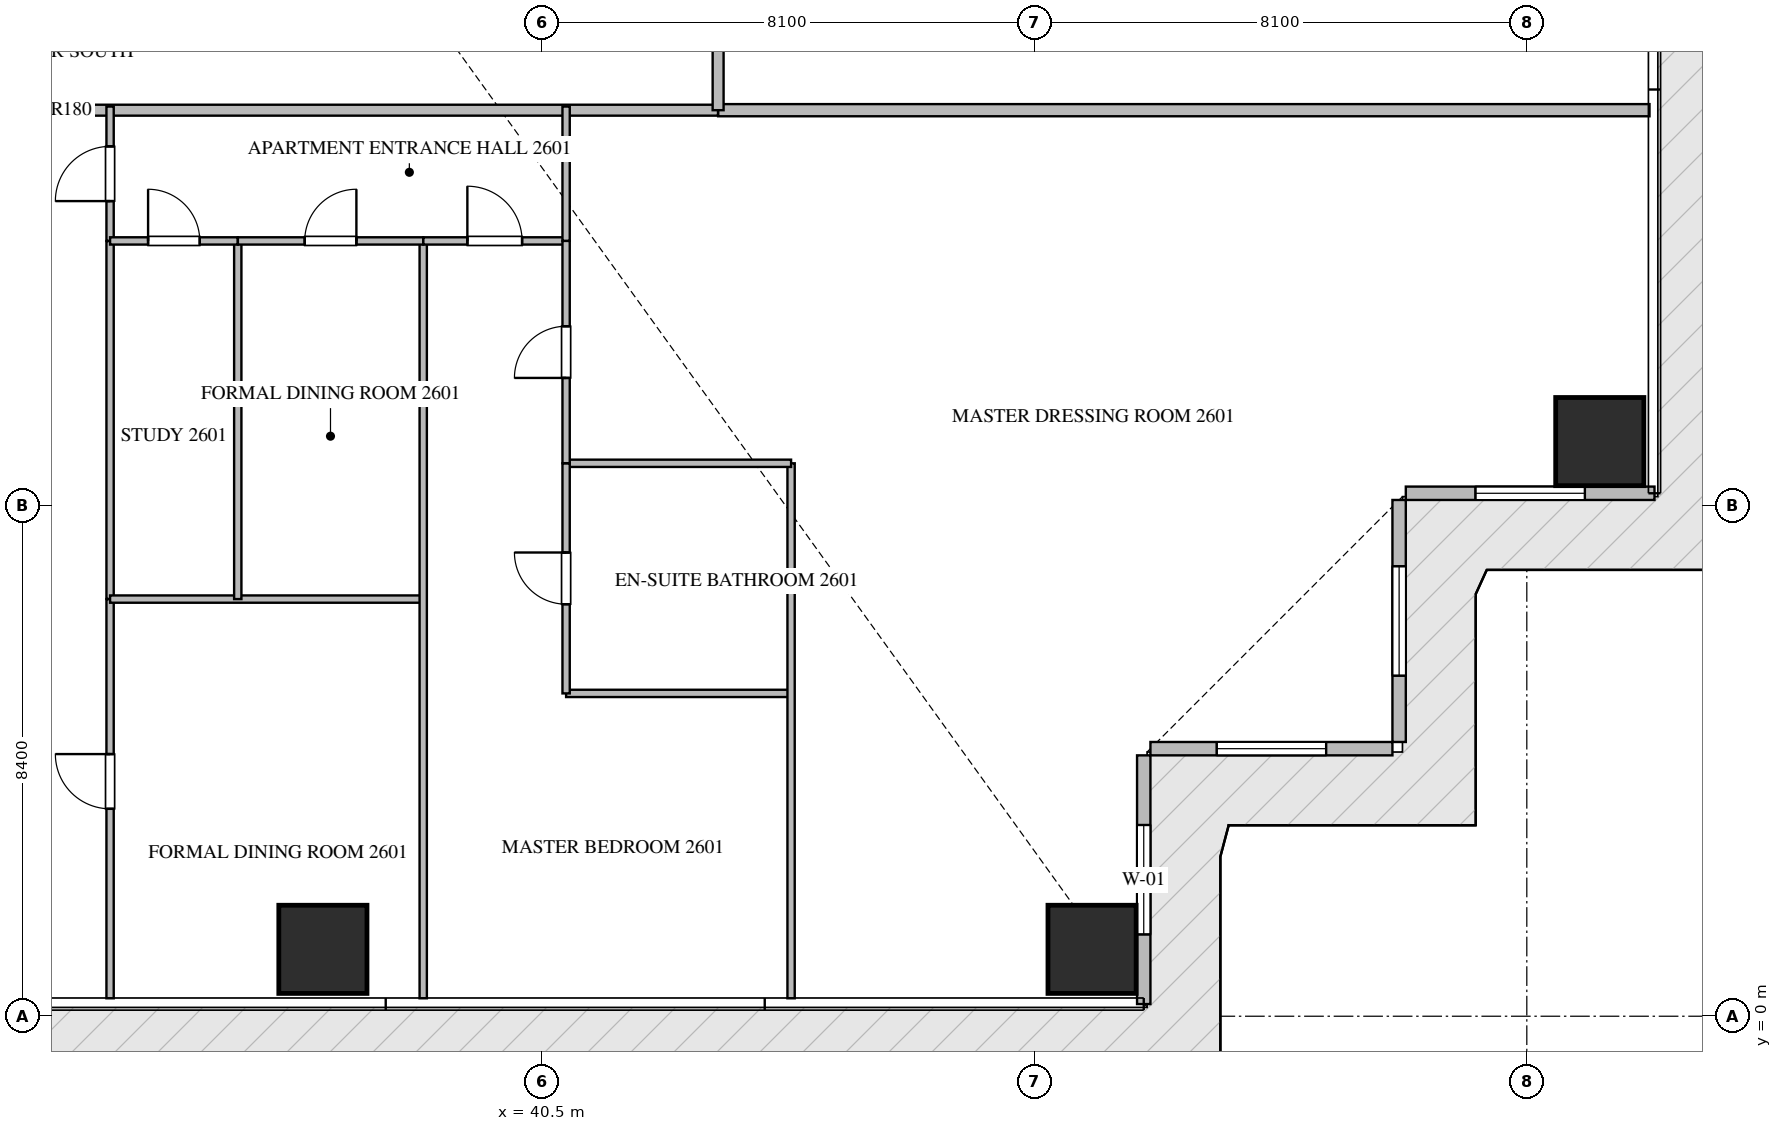
"""IFC4 building model, lengths in metres.
Left out: names, types, materials, properties, quantities, classifications, styles, units other than length and angle.
Written with IfcOpenShell. Run it as: python <this file> out.ifc"""

import sys

from ifc_helpers import new_model, si_unit, direction, frame, frame_2d, origin, origin_2d, place, context, subcontext, project, spatial, rectangle, extrude, source, transform, mapped, element, fill, save


model = new_model("IFC4")
c1 = context("Model", 3, precision=1e-05, world=origin(), true_north=direction((0.0, 1.0)))
c2 = subcontext(c1, "Body", "Model", "MODEL_VIEW")
j1 = project(units=[si_unit("LENGTHUNIT", "METRE"), si_unit("PLANEANGLEUNIT", "RADIAN")], contexts=[c1])
p1 = place(None, origin())
s1 = spatial("IfcSite", under=j1, at=p1, CompositionType="ELEMENT")
p2 = place(p1, origin())
s2 = spatial("IfcBuilding", under=s1, at=p2, CompositionType="ELEMENT")
p3 = place(p2, frame((0.0, 0.0, 105.45)))
s3 = spatial("IfcBuildingStorey", under=s2, at=p3, CompositionType="ELEMENT", Elevation=105.45)
m1 = source(origin(), c2, "Body", "SweptSolid", [
    extrude(rectangle(XDim=1.45, YDim=1.45, at=origin_2d()), origin(), (0.0, 0.0, 1.0), 3.65),
])
for number, where, z_axis, x_axis in (
    (1, (36.9, 1.1, -0.26), (0.0, 0.0, 1.0), (1.0, 0.0, 0.0)),
    (2, (49.55, 1.1, -0.26), (0.0, 0.0, 1.0), (1.0, 0.0, 0.0)),
    (3, (57.9, 9.45, -0.26), (0.0, 0.0, 1.0), (1.0, 0.0, 0.0)),
):
    element("IfcColumn", number, at=place(p3, frame(where, z_axis=z_axis, x_axis=x_axis)), inside=s3, PredefinedType="COLUMN", context=c2, shape_type="MappedRepresentation", body=[
        mapped(m1, transform((0.0, 0.0, 0.0), scale=1.0)),
    ])
p4 = place(p3, frame((50.4, 0.2, 0.0), z_axis=(0.0, 0.0, 1.0), x_axis=(0.0, 1.0, 0.0)))
e4 = element("IfcWall", 4, at=p4, inside=s3, PredefinedType="ELEMENTEDWALL", context=c2, shape_type="SweptSolid", body=[
    extrude(rectangle(XDim=4.09, YDim=0.22, at=frame_2d((2.045, 0.0))), origin(), (0.0, 0.0, 1.0), 3.375),
])
p5 = place(p4, frame((1.145, 0.0, 0.65)))
e5 = element("IfcOpeningElement", 5, at=p5, cuts=e4, PredefinedType="OPENING", context=c2, shape_type="SweptSolid", body=[
    extrude(rectangle(XDim=1.8, YDim=2.1, at=frame_2d((0.9, 1.05))), frame((0.0, 0.12, 0.0), z_axis=(0.0, -1.0, 0.0), x_axis=(1.0, 0.0, 0.0)), (0.0, 0.0, 1.0), 0.24),
])
p6 = place(p3, frame((50.51, 4.4, 0.0), z_axis=(0.0, 0.0, 1.0), x_axis=(1.0, 0.0, 0.0)))
e6 = element("IfcWall", 6, at=p6, inside=s3, PredefinedType="ELEMENTEDWALL", context=c2, shape_type="SweptSolid", body=[
    extrude(rectangle(XDim=3.98, YDim=0.22, at=frame_2d((1.99, 0.0))), origin(), (0.0, 0.0, 1.0), 3.375),
])
p7 = place(p6, frame((1.09, 0.0, 0.65)))
e7 = element("IfcOpeningElement", 7, at=p7, cuts=e6, PredefinedType="OPENING", context=c2, shape_type="SweptSolid", body=[
    extrude(rectangle(XDim=1.8, YDim=2.1, at=frame_2d((0.9, 1.05))), frame((0.0, 0.12, 0.0), z_axis=(0.0, -1.0, 0.0), x_axis=(1.0, 0.0, 0.0)), (0.0, 0.0, 1.0), 0.24),
])
p8 = place(p3, frame((54.6, 4.51, 0.0), z_axis=(0.0, 0.0, 1.0), x_axis=(0.0, 1.0, 0.0)))
e8 = element("IfcWall", 8, at=p8, inside=s3, PredefinedType="ELEMENTEDWALL", context=c2, shape_type="SweptSolid", body=[
    extrude(rectangle(XDim=3.98, YDim=0.22, at=frame_2d((1.99, 0.0))), origin(), (0.0, 0.0, 1.0), 3.375),
])
p9 = place(p8, frame((1.09, 0.0, 0.65)))
e9 = element("IfcOpeningElement", 9, at=p9, cuts=e8, PredefinedType="OPENING", context=c2, shape_type="SweptSolid", body=[
    extrude(rectangle(XDim=1.8, YDim=2.1, at=frame_2d((0.9, 1.05))), frame((0.0, 0.12, 0.0), z_axis=(0.0, -1.0, 0.0), x_axis=(1.0, 0.0, 0.0)), (0.0, 0.0, 1.0), 0.24),
])
p10 = place(p3, frame((54.71, 8.6, 0.0), z_axis=(0.0, 0.0, 1.0), x_axis=(1.0, 0.0, 0.0)))
e10 = element("IfcWall", 10, at=p10, inside=s3, PredefinedType="ELEMENTEDWALL", context=c2, shape_type="SweptSolid", body=[
    extrude(rectangle(XDim=4.09, YDim=0.22, at=frame_2d((2.045, 0.0))), origin(), (0.0, 0.0, 1.0), 3.375),
])
p11 = place(p10, frame((1.145, 0.0, 0.65)))
e11 = element("IfcOpeningElement", 11, at=p11, cuts=e10, PredefinedType="OPENING", context=c2, shape_type="SweptSolid", body=[
    extrude(rectangle(XDim=1.8, YDim=2.1, at=frame_2d((0.9, 1.05))), frame((0.0, 0.12, 0.0), z_axis=(0.0, -1.0, 0.0), x_axis=(1.0, 0.0, 0.0)), (0.0, 0.0, 1.0), 0.24),
])
p12 = place(p3, frame((43.4, 14.9, 0.0), z_axis=(0.0, 0.0, 1.0), x_axis=(1.0, 0.0, 0.0)))
e12 = element("IfcWall", 12, at=p12, inside=s3, PredefinedType="PARTITIONING", context=c2, shape_type="SweptSolid", body=[
    extrude(rectangle(XDim=15.318, YDim=0.2, at=frame_2d((7.659, 0.0))), origin(), (0.0, 0.0, 1.0), 3.39),
])
p13 = place(p3, frame((21.402, 14.9, 0.0), z_axis=(0.0, 0.0, 1.0), x_axis=(1.0, 0.0, 0.0)))
e13 = element("IfcWall", 13, at=p13, inside=s3, PredefinedType="PARTITIONING", context=c2, shape_type="SweptSolid", body=[
    extrude(rectangle(XDim=21.996, YDim=0.18, at=frame_2d((10.998, 0.0))), origin(), (0.0, 0.0, 1.0), 3.39),
])
p14 = place(p13, frame((7.202, 0.0, 0.0)))
e14 = element("IfcOpeningElement", 14, at=p14, cuts=e13, PredefinedType="OPENING", context=c2, shape_type="SweptSolid", body=[
    extrude(rectangle(XDim=1.0, YDim=2.15, at=frame_2d((0.5, 1.075))), frame((0.0, 0.1, 0.0), z_axis=(0.0, -1.0, 0.0), x_axis=(1.0, 0.0, 0.0)), (0.0, 0.0, 1.0), 0.2),
])
p15 = place(p3, frame((43.4, 14.9, 0.0), z_axis=(0.0, 0.0, 1.0), x_axis=(0.0, 1.0, 0.0)))
e15 = element("IfcWall", 15, at=p15, inside=s3, PredefinedType="PARTITIONING", context=c2, shape_type="SweptSolid", body=[
    extrude(rectangle(XDim=20.6, YDim=0.18, at=frame_2d((10.3, 0.0))), origin(), (0.0, 0.0, 1.0), 3.39),
])
p16 = place(p15, frame((1.82, 0.0, 0.0)))
e16 = element("IfcOpeningElement", 16, at=p16, cuts=e15, PredefinedType="OPENING", context=c2, shape_type="SweptSolid", body=[
    extrude(rectangle(XDim=1.0, YDim=2.15, at=frame_2d((0.5, 1.075))), frame((0.0, 0.1, 0.0), z_axis=(0.0, -1.0, 0.0), x_axis=(1.0, 0.0, 0.0)), (0.0, 0.0, 1.0), 0.2),
])
p17 = place(p15, frame((11.27, 0.0, 0.0)))
e17 = element("IfcOpeningElement", 17, at=p17, cuts=e15, PredefinedType="OPENING", context=c2, shape_type="SweptSolid", body=[
    extrude(rectangle(XDim=1.0, YDim=2.15, at=frame_2d((0.5, 1.075))), frame((0.0, 0.1, 0.0), z_axis=(0.0, -1.0, 0.0), x_axis=(1.0, 0.0, 0.0)), (0.0, 0.0, 1.0), 0.2),
])
p18 = place(p15, frame((17.92, 0.0, 0.0)))
e18 = element("IfcOpeningElement", 18, at=p18, cuts=e15, PredefinedType="OPENING", context=c2, shape_type="SweptSolid", body=[
    extrude(rectangle(XDim=1.0, YDim=2.15, at=frame_2d((0.5, 1.075))), frame((0.0, 0.1, 0.0), z_axis=(0.0, -1.0, 0.0), x_axis=(1.0, 0.0, 0.0)), (0.0, 0.0, 1.0), 0.2),
])
p19 = place(p3, frame((33.4, 12.75, 0.0), z_axis=(0.0, 0.0, 1.0), x_axis=(0.0, 1.0, 0.0)))
e19 = element("IfcWall", 19, at=p19, inside=s3, PredefinedType="PARTITIONING", context=c2, shape_type="SweptSolid", body=[
    extrude(rectangle(XDim=2.21, YDim=0.12, at=frame_2d((1.105, 0.0))), origin(), (0.0, 0.0, 1.0), 3.39),
])
p20 = place(p19, frame((0.655, 0.0, 0.0)))
e20 = element("IfcOpeningElement", 20, at=p20, cuts=e19, PredefinedType="OPENING", context=c2, shape_type="SweptSolid", body=[
    extrude(rectangle(XDim=0.9, YDim=2.1, at=frame_2d((0.45, 1.05))), frame((0.0, 0.07, 0.0), z_axis=(0.0, -1.0, 0.0), x_axis=(1.0, 0.0, 0.0)), (0.0, 0.0, 1.0), 0.14),
])
p21 = place(p3, frame((33.4, 0.295, 0.0), z_axis=(0.0, 0.0, 1.0), x_axis=(0.0, 1.0, 0.0)))
e21 = element("IfcWall", 21, at=p21, inside=s3, PredefinedType="PARTITIONING", context=c2, shape_type="SweptSolid", body=[
    extrude(rectangle(XDim=6.565, YDim=0.12, at=frame_2d((3.283, 0.0))), origin(), (0.0, 0.0, 1.0), 3.39),
])
p22 = place(p21, frame((3.116, 0.0, 0.0)))
e22 = element("IfcOpeningElement", 22, at=p22, cuts=e21, PredefinedType="OPENING", context=c2, shape_type="SweptSolid", body=[
    extrude(rectangle(XDim=0.9, YDim=2.1, at=frame_2d((0.45, 1.05))), frame((0.0, 0.07, 0.0), z_axis=(0.0, -1.0, 0.0), x_axis=(1.0, 0.0, 0.0)), (0.0, 0.0, 1.0), 0.14),
])
p23 = place(p3, frame((33.4, 6.862, 0.0), z_axis=(0.0, 0.0, 1.0), x_axis=(0.0, 1.0, 0.0)))
e23 = element("IfcWall", 23, at=p23, inside=s3, PredefinedType="PARTITIONING", context=c2, shape_type="SweptSolid", body=[
    extrude(rectangle(XDim=5.886, YDim=0.12, at=frame_2d((2.943, 0.0))), origin(), (0.0, 0.0, 1.0), 3.39),
])
p24 = place(p3, frame((33.4, 6.86, 0.0), z_axis=(0.0, 0.0, 1.0), x_axis=(1.0, 0.0, 0.0)))
e24 = element("IfcWall", 24, at=p24, inside=s3, PredefinedType="PARTITIONING", context=c2, shape_type="SweptSolid", body=[
    extrude(rectangle(XDim=5.15, YDim=0.12, at=frame_2d((2.575, 0.0))), origin(), (0.0, 0.0, 1.0), 3.39),
])
p25 = place(p3, frame((38.55, 0.295, 0.0), z_axis=(0.0, 0.0, 1.0), x_axis=(0.0, 1.0, 0.0)))
e25 = element("IfcWall", 25, at=p25, inside=s3, PredefinedType="PARTITIONING", context=c2, shape_type="SweptSolid", body=[
    extrude(rectangle(XDim=12.455, YDim=0.12, at=frame_2d((6.228, 0.0))), origin(), (0.0, 0.0, 1.0), 3.39),
])
p26 = place(p3, frame((35.5, 6.86, 0.0), z_axis=(0.0, 0.0, 1.0), x_axis=(0.0, 1.0, 0.0)))
e26 = element("IfcWall", 26, at=p26, inside=s3, PredefinedType="PARTITIONING", context=c2, shape_type="SweptSolid", body=[
    extrude(rectangle(XDim=5.89, YDim=0.12, at=frame_2d((2.945, 0.0))), origin(), (0.0, 0.0, 1.0), 3.39),
])
p27 = place(p3, frame((33.4, 12.75, 0.0), z_axis=(0.0, 0.0, 1.0), x_axis=(1.0, 0.0, 0.0)))
e27 = element("IfcWall", 27, at=p27, inside=s3, PredefinedType="PARTITIONING", context=c2, shape_type="SweptSolid", body=[
    extrude(rectangle(XDim=2.1, YDim=0.12, at=frame_2d((1.05, 0.0))), origin(), (0.0, 0.0, 1.0), 3.39),
])
p28 = place(p27, frame((0.625, 0.0, 0.0)))
e28 = element("IfcOpeningElement", 28, at=p28, cuts=e27, PredefinedType="OPENING", context=c2, shape_type="SweptSolid", body=[
    extrude(rectangle(XDim=0.85, YDim=2.1, at=frame_2d((0.425, 1.05))), frame((0.0, 0.07, 0.0), z_axis=(0.0, -1.0, 0.0), x_axis=(1.0, 0.0, 0.0)), (0.0, 0.0, 1.0), 0.14),
])
p29 = place(p3, frame((35.502, 12.75, 0.0), z_axis=(0.0, 0.0, 1.0), x_axis=(1.0, 0.0, 0.0)))
e29 = element("IfcWall", 29, at=p29, inside=s3, PredefinedType="PARTITIONING", context=c2, shape_type="SweptSolid", body=[
    extrude(rectangle(XDim=3.048, YDim=0.12, at=frame_2d((1.524, 0.0))), origin(), (0.0, 0.0, 1.0), 3.39),
])
p30 = place(p29, frame((1.099, 0.0, 0.0)))
e30 = element("IfcOpeningElement", 30, at=p30, cuts=e29, PredefinedType="OPENING", context=c2, shape_type="SweptSolid", body=[
    extrude(rectangle(XDim=0.85, YDim=2.1, at=frame_2d((0.425, 1.05))), frame((0.0, 0.07, 0.0), z_axis=(0.0, -1.0, 0.0), x_axis=(1.0, 0.0, 0.0)), (0.0, 0.0, 1.0), 0.14),
])
p31 = place(p3, frame((38.552, 12.75, 0.0), z_axis=(0.0, 0.0, 1.0), x_axis=(1.0, 0.0, 0.0)))
e31 = element("IfcWall", 31, at=p31, inside=s3, PredefinedType="PARTITIONING", context=c2, shape_type="SweptSolid", body=[
    extrude(rectangle(XDim=2.348, YDim=0.12, at=frame_2d((1.174, 0.0))), origin(), (0.0, 0.0, 1.0), 3.39),
])
p32 = place(p31, frame((0.724, 0.0, 0.0)))
e32 = element("IfcOpeningElement", 32, at=p32, cuts=e31, PredefinedType="OPENING", context=c2, shape_type="SweptSolid", body=[
    extrude(rectangle(XDim=0.9, YDim=2.1, at=frame_2d((0.45, 1.05))), frame((0.0, 0.07, 0.0), z_axis=(0.0, -1.0, 0.0), x_axis=(1.0, 0.0, 0.0)), (0.0, 0.0, 1.0), 0.14),
])
p33 = place(p3, frame((40.9, 5.309, 0.0), z_axis=(0.0, 0.0, 1.0), x_axis=(1.0, 0.0, 0.0)))
e33 = element("IfcWall", 33, at=p33, inside=s3, PredefinedType="PARTITIONING", context=c2, shape_type="SweptSolid", body=[
    extrude(rectangle(XDim=3.7, YDim=0.12, at=frame_2d((1.85, 0.0))), origin(), (0.0, 0.0, 1.0), 3.39),
])
p34 = place(p3, frame((44.6, 0.295, 0.0), z_axis=(0.0, 0.0, 1.0), x_axis=(0.0, 1.0, 0.0)))
e34 = element("IfcWall", 34, at=p34, inside=s3, PredefinedType="PARTITIONING", context=c2, shape_type="SweptSolid", body=[
    extrude(rectangle(XDim=8.798, YDim=0.12, at=frame_2d((4.399, 0.0))), origin(), (0.0, 0.0, 1.0), 3.39),
])
p35 = place(p3, frame((40.9, 9.093, 0.0), z_axis=(0.0, 0.0, 1.0), x_axis=(1.0, 0.0, 0.0)))
e35 = element("IfcWall", 35, at=p35, inside=s3, PredefinedType="PARTITIONING", context=c2, shape_type="SweptSolid", body=[
    extrude(rectangle(XDim=3.7, YDim=0.12, at=frame_2d((1.85, 0.0))), origin(), (0.0, 0.0, 1.0), 3.39),
])
p36 = place(p3, frame((40.9, 5.309, 0.0), z_axis=(0.0, 0.0, 1.0), x_axis=(0.0, 1.0, 0.0)))
e36 = element("IfcWall", 36, at=p36, inside=s3, PredefinedType="PARTITIONING", context=c2, shape_type="SweptSolid", body=[
    extrude(rectangle(XDim=3.784, YDim=0.12, at=frame_2d((1.892, 0.0))), origin(), (0.0, 0.0, 1.0), 3.39),
])
p37 = place(p36, frame((1.467, 0.0, 0.0)))
e37 = element("IfcOpeningElement", 37, at=p37, cuts=e36, PredefinedType="OPENING", context=c2, shape_type="SweptSolid", body=[
    extrude(rectangle(XDim=0.85, YDim=2.1, at=frame_2d((0.425, 1.05))), frame((0.0, 0.07, 0.0), z_axis=(0.0, -1.0, 0.0), x_axis=(1.0, 0.0, 0.0)), (0.0, 0.0, 1.0), 0.14),
])
p38 = place(p3, frame((40.9, 9.095, 0.0), z_axis=(0.0, 0.0, 1.0), x_axis=(0.0, 1.0, 0.0)))
e38 = element("IfcWall", 38, at=p38, inside=s3, PredefinedType="PARTITIONING", context=c2, shape_type="SweptSolid", body=[
    extrude(rectangle(XDim=3.655, YDim=0.12, at=frame_2d((1.828, 0.0))), origin(), (0.0, 0.0, 1.0), 3.39),
])
p39 = place(p38, frame((1.402, 0.0, 0.0)))
e39 = element("IfcOpeningElement", 39, at=p39, cuts=e38, PredefinedType="OPENING", context=c2, shape_type="SweptSolid", body=[
    extrude(rectangle(XDim=0.85, YDim=2.1, at=frame_2d((0.425, 1.05))), frame((0.0, 0.07, 0.0), z_axis=(0.0, -1.0, 0.0), x_axis=(1.0, 0.0, 0.0)), (0.0, 0.0, 1.0), 0.14),
])
p40 = place(p3, frame((40.9, 12.752, 0.0), z_axis=(0.0, 0.0, 1.0), x_axis=(0.0, 1.0, 0.0)))
e40 = element("IfcWall", 40, at=p40, inside=s3, PredefinedType="PARTITIONING", context=c2, shape_type="SweptSolid", body=[
    extrude(rectangle(XDim=2.208, YDim=0.12, at=frame_2d((1.104, 0.0))), origin(), (0.0, 0.0, 1.0), 3.39),
])
m2 = source(origin(), c2, "Body", "SweptSolid", [
    extrude(rectangle(XDim=1.8, YDim=2.1, at=frame_2d((0.9, 1.05))), frame((0.0, 0.03, 0.0), z_axis=(0.0, -1.0, 0.0), x_axis=(1.0, 0.0, 0.0)), (0.0, 0.0, 1.0), 0.06),
])
p41 = place(p5, origin())
e41 = element("IfcWindow", 41, at=p41, inside=s3, PartitioningType="SINGLE_PANEL", PredefinedType="WINDOW", context=c2, shape_type="MappedRepresentation", body=[
    mapped(m2, transform((0.0, 0.0, 0.0), scale=1.0)),
])
fill(e5, e41)
p42 = place(p7, origin())
e42 = element("IfcWindow", 42, at=p42, inside=s3, PartitioningType="SINGLE_PANEL", PredefinedType="WINDOW", context=c2, shape_type="MappedRepresentation", body=[
    mapped(m2, transform((0.0, 0.0, 0.0), scale=1.0)),
])
fill(e7, e42)
p43 = place(p9, origin())
e43 = element("IfcWindow", 43, at=p43, inside=s3, PartitioningType="SINGLE_PANEL", PredefinedType="WINDOW", context=c2, shape_type="MappedRepresentation", body=[
    mapped(m2, transform((0.0, 0.0, 0.0), scale=1.0)),
])
fill(e9, e43)
p44 = place(p11, origin())
e44 = element("IfcWindow", 44, at=p44, inside=s3, PartitioningType="SINGLE_PANEL", PredefinedType="WINDOW", context=c2, shape_type="MappedRepresentation", body=[
    mapped(m2, transform((0.0, 0.0, 0.0), scale=1.0)),
])
fill(e11, e44)
m3 = source(origin(), c2, "Body", "SweptSolid", [
    extrude(rectangle(XDim=0.9, YDim=2.1, at=frame_2d((0.45, 1.05))), frame((0.0, 0.025, 0.0), z_axis=(0.0, -1.0, 0.0), x_axis=(1.0, 0.0, 0.0)), (0.0, 0.0, 1.0), 0.05),
])
p45 = place(p20, origin())
e45 = element("IfcDoor", 45, at=p45, inside=s3, OperationType="SINGLE_SWING_LEFT", PredefinedType="DOOR", context=c2, shape_type="MappedRepresentation", body=[
    mapped(m3, transform((0.0, 0.0, 0.0), scale=1.0)),
])
fill(e20, e45)
p46 = place(p22, origin())
e46 = element("IfcDoor", 46, at=p46, inside=s3, OperationType="SINGLE_SWING_RIGHT", PredefinedType="DOOR", context=c2, shape_type="MappedRepresentation", body=[
    mapped(m3, transform((0.0, 0.0, 0.0), scale=1.0)),
])
fill(e22, e46)
m4 = source(origin(), c2, "Body", "SweptSolid", [
    extrude(rectangle(XDim=0.85, YDim=2.1, at=frame_2d((0.425, 1.05))), frame((0.0, 0.025, 0.0), z_axis=(0.0, -1.0, 0.0), x_axis=(1.0, 0.0, 0.0)), (0.0, 0.0, 1.0), 0.05),
])
p47 = place(p28, origin())
e47 = element("IfcDoor", 47, at=p47, inside=s3, OperationType="SINGLE_SWING_LEFT", PredefinedType="DOOR", context=c2, shape_type="MappedRepresentation", body=[
    mapped(m4, transform((0.0, 0.0, 0.0), scale=1.0)),
])
fill(e28, e47)
p48 = place(p30, origin())
e48 = element("IfcDoor", 48, at=p48, inside=s3, OperationType="SINGLE_SWING_RIGHT", PredefinedType="DOOR", context=c2, shape_type="MappedRepresentation", body=[
    mapped(m4, transform((0.0, 0.0, 0.0), scale=1.0)),
])
fill(e30, e48)
p49 = place(p32, origin())
e49 = element("IfcDoor", 49, at=p49, inside=s3, OperationType="SINGLE_SWING_LEFT", PredefinedType="DOOR", context=c2, shape_type="MappedRepresentation", body=[
    mapped(m3, transform((0.0, 0.0, 0.0), scale=1.0)),
])
fill(e32, e49)
p50 = place(p37, origin())
e50 = element("IfcDoor", 50, at=p50, inside=s3, OperationType="SINGLE_SWING_RIGHT", PredefinedType="DOOR", context=c2, shape_type="MappedRepresentation", body=[
    mapped(m4, transform((0.0, 0.0, 0.0), scale=1.0)),
])
fill(e37, e50)
p51 = place(p39, origin())
e51 = element("IfcDoor", 51, at=p51, inside=s3, OperationType="SINGLE_SWING_LEFT", PredefinedType="DOOR", context=c2, shape_type="MappedRepresentation", body=[
    mapped(m4, transform((0.0, 0.0, 0.0), scale=1.0)),
])
fill(e39, e51)
save(model, sys.argv[1])
